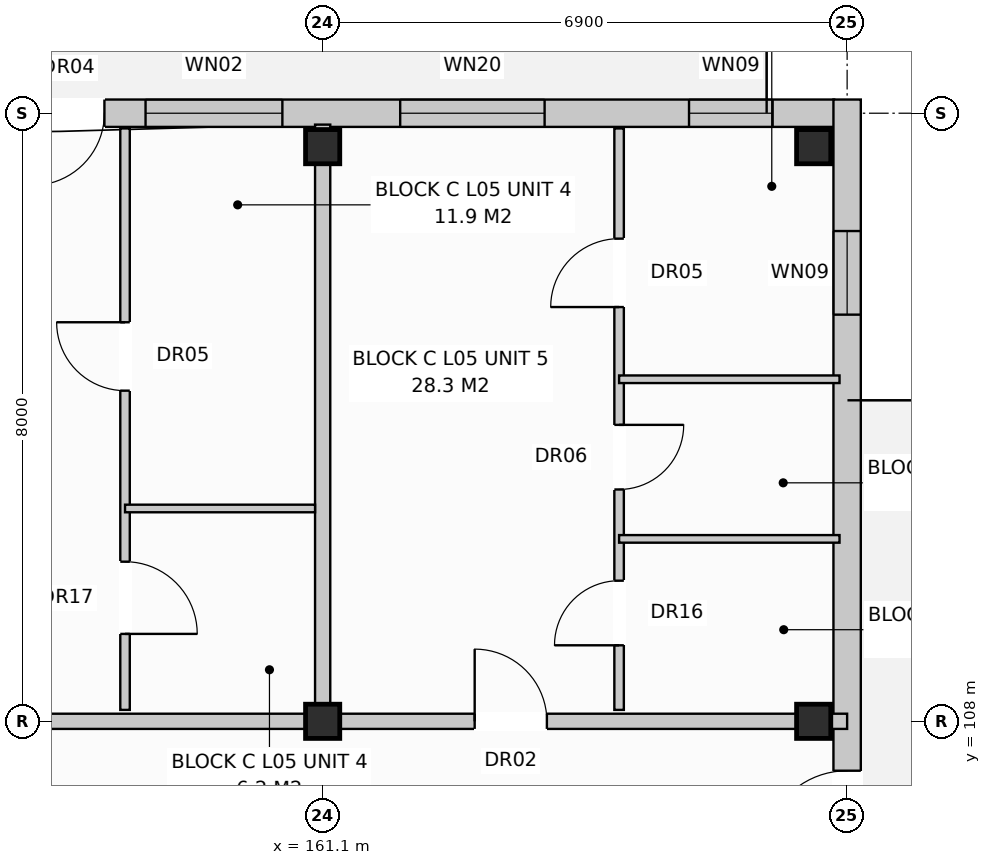
"""IFC4 building model, lengths in metres.
Left out: names, types, materials, properties, quantities, classifications, styles, units other than length and angle.
Written with IfcOpenShell. Run it as: python <this file> out.ifc"""

import sys

from ifc_helpers import new_model, si_unit, direction, frame, frame_2d, origin, origin_with_axes, origin_2d, place, context, subcontext, project, spatial, rectangle, extrude, element, fill, save


model = new_model("IFC4")
c1 = context("Model", 3, precision=1e-05, world=origin(), true_north=direction((0.0, 1.0)))
c2 = subcontext(c1, "Body", "Model", "MODEL_VIEW")
j1 = project(units=[si_unit("LENGTHUNIT", "METRE"), si_unit("PLANEANGLEUNIT", "RADIAN")], contexts=[c1])
p1 = place(None, origin())
s1 = spatial("IfcSite", under=j1, at=p1, CompositionType="ELEMENT")
p2 = place(p1, origin())
s2 = spatial("IfcBuilding", under=s1, at=p2, CompositionType="ELEMENT")
p3 = place(p2, frame((0.0, 0.0, 17.6)))
s3 = spatial("IfcBuildingStorey", under=s2, at=p3, CompositionType="ELEMENT", Elevation=17.6)
for number, where, z_axis, x_axis in (
    (1, (161.1, 108.0, 0.0), (0.0, 0.0, 1.0), (1.0, 0.0, 0.0)),
    (2, (161.1, 115.56, 0.0), (0.0, 0.0, 1.0), (1.0, 0.0, 0.0)),
    (3, (167.56, 108.0, 0.0), (0.0, 0.0, 1.0), (1.0, 0.0, 0.0)),
    (4, (167.56, 115.56, 0.0), (0.0, 0.0, 1.0), (1.0, 0.0, 0.0)),
):
    element("IfcColumn", number, at=place(p3, frame(where, z_axis=z_axis, x_axis=x_axis)), inside=s3, PredefinedType="COLUMN", context=c2, shape_type="SweptSolid", body=[
        extrude(rectangle(XDim=0.45, YDim=0.45, at=origin_2d()), origin(), (0.0, 0.0, 1.0), 3.2),
    ])
p4 = place(p3, frame((112.97, 116.0, 0.0), z_axis=(0.0, 0.0, 1.0), x_axis=(1.0, 0.0, 0.0)))
e5 = element("IfcWall", 5, at=p4, inside=s3, PredefinedType="STANDARD", context=c2, shape_type="SweptSolid", body=[
    extrude(rectangle(XDim=54.86, YDim=0.36, at=frame_2d((27.43, 0.0))), origin(), (0.0, 0.0, 1.0), 2.95),
])
p5 = place(p4, frame((4.891, 0.0, 0.0)))
e6 = element("IfcOpeningElement", 6, at=p5, cuts=e5, PredefinedType="OPENING", context=c2, shape_type="SweptSolid", body=[
    extrude(rectangle(XDim=0.95, YDim=2.1, at=frame_2d((0.475, 1.05))), frame((0.0, 0.192, 0.0), z_axis=(0.0, -1.0, 0.0), x_axis=(1.0, 0.0, 0.0)), (0.0, 0.0, 1.0), 0.384),
])
p6 = place(p4, frame((15.309, 0.0, 0.0)))
e7 = element("IfcOpeningElement", 7, at=p6, cuts=e5, PredefinedType="OPENING", context=c2, shape_type="SweptSolid", body=[
    extrude(rectangle(XDim=0.95, YDim=2.1, at=frame_2d((0.475, 1.05))), frame((0.0, 0.192, 0.0), z_axis=(0.0, -1.0, 0.0), x_axis=(1.0, 0.0, 0.0)), (0.0, 0.0, 1.0), 0.384),
])
p7 = place(p4, frame((31.409, 0.0, 0.0)))
e8 = element("IfcOpeningElement", 8, at=p7, cuts=e5, PredefinedType="OPENING", context=c2, shape_type="SweptSolid", body=[
    extrude(rectangle(XDim=0.95, YDim=2.1, at=frame_2d((0.475, 1.05))), frame((0.0, 0.192, 0.0), z_axis=(0.0, -1.0, 0.0), x_axis=(1.0, 0.0, 0.0)), (0.0, 0.0, 1.0), 0.384),
])
p8 = place(p4, frame((44.309, 0.0, 0.0)))
e9 = element("IfcOpeningElement", 9, at=p8, cuts=e5, PredefinedType="OPENING", context=c2, shape_type="SweptSolid", body=[
    extrude(rectangle(XDim=0.95, YDim=2.1, at=frame_2d((0.475, 1.05))), frame((0.0, 0.192, 0.0), z_axis=(0.0, -1.0, 0.0), x_axis=(1.0, 0.0, 0.0)), (0.0, 0.0, 1.0), 0.384),
])
p9 = place(p4, frame((2.025, 0.0, 0.8)))
e10 = element("IfcOpeningElement", 10, at=p9, cuts=e5, PredefinedType="OPENING", context=c2, shape_type="SweptSolid", body=[
    extrude(rectangle(XDim=1.95, YDim=1.65, at=frame_2d((0.975, 0.825))), frame((0.0, 0.192, 0.0), z_axis=(0.0, -1.0, 0.0), x_axis=(1.0, 0.0, 0.0)), (0.0, 0.0, 1.0), 0.384),
])
p10 = place(p4, frame((8.15, 0.0, 0.72)))
e11 = element("IfcOpeningElement", 11, at=p10, cuts=e5, PredefinedType="OPENING", context=c2, shape_type="SweptSolid", body=[
    extrude(rectangle(XDim=1.1, YDim=1.5, at=frame_2d((0.55, 0.75))), frame((0.0, 0.192, 0.0), z_axis=(0.0, -1.0, 0.0), x_axis=(1.0, 0.0, 0.0)), (0.0, 0.0, 1.0), 0.384),
])
p11 = place(p4, frame((11.675, 0.0, 0.85)))
e12 = element("IfcOpeningElement", 12, at=p11, cuts=e5, PredefinedType="OPENING", context=c2, shape_type="SweptSolid", body=[
    extrude(rectangle(XDim=1.35, YDim=1.6, at=frame_2d((0.675, 0.8))), frame((0.0, 0.192, 0.0), z_axis=(0.0, -1.0, 0.0), x_axis=(1.0, 0.0, 0.0)), (0.0, 0.0, 1.0), 0.384),
])
p12 = place(p4, frame((17.525, 0.0, 0.8)))
e13 = element("IfcOpeningElement", 13, at=p12, cuts=e5, PredefinedType="OPENING", context=c2, shape_type="SweptSolid", body=[
    extrude(rectangle(XDim=1.95, YDim=1.65, at=frame_2d((0.975, 0.825))), frame((0.0, 0.192, 0.0), z_axis=(0.0, -1.0, 0.0), x_axis=(1.0, 0.0, 0.0)), (0.0, 0.0, 1.0), 0.384),
])
p13 = place(p4, frame((21.6, 0.0, 0.8)))
e14 = element("IfcOpeningElement", 14, at=p13, cuts=e5, PredefinedType="OPENING", context=c2, shape_type="SweptSolid", body=[
    extrude(rectangle(XDim=1.8, YDim=1.7, at=frame_2d((0.9, 0.85))), frame((0.0, 0.192, 0.0), z_axis=(0.0, -1.0, 0.0), x_axis=(1.0, 0.0, 0.0)), (0.0, 0.0, 1.0), 0.384),
])
p14 = place(p4, frame((25.35, 0.0, 0.72)))
e15 = element("IfcOpeningElement", 15, at=p14, cuts=e5, PredefinedType="OPENING", context=c2, shape_type="SweptSolid", body=[
    extrude(rectangle(XDim=1.1, YDim=1.5, at=frame_2d((0.55, 0.75))), frame((0.0, 0.192, 0.0), z_axis=(0.0, -1.0, 0.0), x_axis=(1.0, 0.0, 0.0)), (0.0, 0.0, 1.0), 0.384),
])
p15 = place(p4, frame((29.125, 0.0, 0.8)))
e16 = element("IfcOpeningElement", 16, at=p15, cuts=e5, PredefinedType="OPENING", context=c2, shape_type="SweptSolid", body=[
    extrude(rectangle(XDim=1.95, YDim=1.65, at=frame_2d((0.975, 0.825))), frame((0.0, 0.192, 0.0), z_axis=(0.0, -1.0, 0.0), x_axis=(1.0, 0.0, 0.0)), (0.0, 0.0, 1.0), 0.384),
])
p16 = place(p4, frame((34.9, 0.0, 0.8)))
e17 = element("IfcOpeningElement", 17, at=p16, cuts=e5, PredefinedType="OPENING", context=c2, shape_type="SweptSolid", body=[
    extrude(rectangle(XDim=1.8, YDim=1.7, at=frame_2d((0.9, 0.85))), frame((0.0, 0.192, 0.0), z_axis=(0.0, -1.0, 0.0), x_axis=(1.0, 0.0, 0.0)), (0.0, 0.0, 1.0), 0.384),
])
p17 = place(p4, frame((38.45, 0.0, 0.72)))
e18 = element("IfcOpeningElement", 18, at=p17, cuts=e5, PredefinedType="OPENING", context=c2, shape_type="SweptSolid", body=[
    extrude(rectangle(XDim=1.1, YDim=1.5, at=frame_2d((0.55, 0.75))), frame((0.0, 0.192, 0.0), z_axis=(0.0, -1.0, 0.0), x_axis=(1.0, 0.0, 0.0)), (0.0, 0.0, 1.0), 0.384),
])
p18 = place(p4, frame((42.55, 0.0, 0.72)))
e19 = element("IfcOpeningElement", 19, at=p18, cuts=e5, PredefinedType="OPENING", context=c2, shape_type="SweptSolid", body=[
    extrude(rectangle(XDim=1.1, YDim=1.5, at=frame_2d((0.55, 0.75))), frame((0.0, 0.192, 0.0), z_axis=(0.0, -1.0, 0.0), x_axis=(1.0, 0.0, 0.0)), (0.0, 0.0, 1.0), 0.384),
])
p19 = place(p4, frame((45.8, 0.0, 0.8)))
e20 = element("IfcOpeningElement", 20, at=p19, cuts=e5, PredefinedType="OPENING", context=c2, shape_type="SweptSolid", body=[
    extrude(rectangle(XDim=1.8, YDim=1.7, at=frame_2d((0.9, 0.85))), frame((0.0, 0.192, 0.0), z_axis=(0.0, -1.0, 0.0), x_axis=(1.0, 0.0, 0.0)), (0.0, 0.0, 1.0), 0.384),
])
p20 = place(p4, frame((49.15, 0.0, 0.72)))
e21 = element("IfcOpeningElement", 21, at=p20, cuts=e5, PredefinedType="OPENING", context=c2, shape_type="SweptSolid", body=[
    extrude(rectangle(XDim=1.9, YDim=1.85, at=frame_2d((0.95, 0.925))), frame((0.0, 0.192, 0.0), z_axis=(0.0, -1.0, 0.0), x_axis=(1.0, 0.0, 0.0)), (0.0, 0.0, 1.0), 0.384),
])
p21 = place(p4, frame((52.95, 0.0, 0.72)))
e22 = element("IfcOpeningElement", 22, at=p21, cuts=e5, PredefinedType="OPENING", context=c2, shape_type="SweptSolid", body=[
    extrude(rectangle(XDim=1.1, YDim=1.5, at=frame_2d((0.55, 0.75))), frame((0.0, 0.192, 0.0), z_axis=(0.0, -1.0, 0.0), x_axis=(1.0, 0.0, 0.0)), (0.0, 0.0, 1.0), 0.384),
])
p22 = place(p3, frame((168.0, 97.42, 0.0), z_axis=(0.0, 0.0, 1.0), x_axis=(0.0, 1.0, 0.0)))
e23 = element("IfcWall", 23, at=p22, inside=s3, PredefinedType="STANDARD", context=c2, shape_type="SweptSolid", body=[
    extrude(rectangle(XDim=18.76, YDim=0.36, at=frame_2d((9.38, 0.0))), origin(), (0.0, 0.0, 1.0), 2.95),
])
p23 = place(p22, frame((8.83, 0.0, 0.0)))
e24 = element("IfcOpeningElement", 24, at=p23, cuts=e23, PredefinedType="OPENING", context=c2, shape_type="SweptSolid", body=[
    extrude(rectangle(XDim=1.1, YDim=2.1, at=frame_2d((0.55, 1.05))), frame((0.0, 0.192, 0.0), z_axis=(0.0, -1.0, 0.0), x_axis=(1.0, 0.0, 0.0)), (0.0, 0.0, 1.0), 0.384),
])
p24 = place(p22, frame((1.73, 0.0, 0.72)))
e25 = element("IfcOpeningElement", 25, at=p24, cuts=e23, PredefinedType="OPENING", context=c2, shape_type="SweptSolid", body=[
    extrude(rectangle(XDim=1.1, YDim=1.5, at=frame_2d((0.55, 0.75))), frame((0.0, 0.192, 0.0), z_axis=(0.0, -1.0, 0.0), x_axis=(1.0, 0.0, 0.0)), (0.0, 0.0, 1.0), 0.384),
])
p25 = place(p22, frame((15.93, 0.0, 0.72)))
e26 = element("IfcOpeningElement", 26, at=p25, cuts=e23, PredefinedType="OPENING", context=c2, shape_type="SweptSolid", body=[
    extrude(rectangle(XDim=1.1, YDim=1.5, at=frame_2d((0.55, 0.75))), frame((0.0, 0.192, 0.0), z_axis=(0.0, -1.0, 0.0), x_axis=(1.0, 0.0, 0.0)), (0.0, 0.0, 1.0), 0.384),
])
p26 = place(p3, frame((161.1, 108.15, 0.0), z_axis=(0.0, 0.0, 1.0), x_axis=(0.0, 1.0, 0.0)))
e27 = element("IfcWall", 27, at=p26, inside=s3, PredefinedType="PARTITIONING", context=c2, shape_type="SweptSolid", body=[
    extrude(rectangle(XDim=7.7, YDim=0.2, at=frame_2d((3.85, 0.0))), origin(), (0.0, 0.0, 1.0), 2.39),
])
p27 = place(p3, frame((154.2, 108.0, 0.0), z_axis=(0.0, 0.0, 1.0), x_axis=(1.0, 0.0, 0.0)))
e28 = element("IfcWall", 28, at=p27, inside=s3, PredefinedType="PARTITIONING", context=c2, shape_type="SweptSolid", body=[
    extrude(rectangle(XDim=6.9, YDim=0.2, at=frame_2d((3.45, 0.0))), origin(), (0.0, 0.0, 1.0), 2.39),
])
p28 = place(p27, frame((2.0, 0.0, 0.0)))
e29 = element("IfcOpeningElement", 29, at=p28, cuts=e28, PredefinedType="OPENING", context=c2, shape_type="SweptSolid", body=[
    extrude(rectangle(XDim=0.95, YDim=2.15, at=frame_2d((0.475, 1.075))), frame((0.0, 0.112, 0.0), z_axis=(0.0, -1.0, 0.0), x_axis=(1.0, 0.0, 0.0)), (0.0, 0.0, 1.0), 0.224),
])
p29 = place(p3, frame((158.5, 108.15, 0.0), z_axis=(0.0, 0.0, 1.0), x_axis=(0.0, 1.0, 0.0)))
e30 = element("IfcWall", 30, at=p29, inside=s3, PredefinedType="PARTITIONING", context=c2, shape_type="SweptSolid", body=[
    extrude(rectangle(XDim=7.65, YDim=0.125, at=frame_2d((3.825, 0.0))), origin(), (0.0, 0.0, 1.0), 2.95),
])
p30 = place(p29, frame((1.0, 0.0, 0.0)))
e31 = element("IfcOpeningElement", 31, at=p30, cuts=e30, PredefinedType="OPENING", context=c2, shape_type="SweptSolid", body=[
    extrude(rectangle(XDim=0.95, YDim=2.1, at=frame_2d((0.475, 1.05))), frame((0.0, 0.074, 0.0), z_axis=(0.0, -1.0, 0.0), x_axis=(1.0, 0.0, 0.0)), (0.0, 0.0, 1.0), 0.149),
])
p31 = place(p29, frame((4.2, 0.0, 0.0)))
e32 = element("IfcOpeningElement", 32, at=p31, cuts=e30, PredefinedType="OPENING", context=c2, shape_type="SweptSolid", body=[
    extrude(rectangle(XDim=0.9, YDim=2.1, at=frame_2d((0.45, 1.05))), frame((0.0, 0.074, 0.0), z_axis=(0.0, -1.0, 0.0), x_axis=(1.0, 0.0, 0.0)), (0.0, 0.0, 1.0), 0.149),
])
p32 = place(p3, frame((158.5, 110.8, 0.0), z_axis=(0.0, 0.0, 1.0), x_axis=(1.0, 0.0, 0.0)))
e33 = element("IfcWall", 33, at=p32, inside=s3, PredefinedType="PARTITIONING", context=c2, shape_type="SweptSolid", body=[
    extrude(rectangle(XDim=2.5, YDim=0.1, at=frame_2d((1.25, 0.0))), origin(), (0.0, 0.0, 1.0), 2.95),
])
p33 = place(p3, frame((161.1, 108.0, 0.0), z_axis=(0.0, 0.0, 1.0), x_axis=(1.0, 0.0, 0.0)))
e34 = element("IfcWall", 34, at=p33, inside=s3, PredefinedType="PARTITIONING", context=c2, shape_type="SweptSolid", body=[
    extrude(rectangle(XDim=6.9, YDim=0.2, at=frame_2d((3.45, 0.0))), origin(), (0.0, 0.0, 1.0), 2.39),
])
p34 = place(p33, frame((2.0, 0.0, 0.0)))
e35 = element("IfcOpeningElement", 35, at=p34, cuts=e34, PredefinedType="OPENING", context=c2, shape_type="SweptSolid", body=[
    extrude(rectangle(XDim=0.95, YDim=2.15, at=frame_2d((0.475, 1.075))), frame((0.0, 0.112, 0.0), z_axis=(0.0, -1.0, 0.0), x_axis=(1.0, 0.0, 0.0)), (0.0, 0.0, 1.0), 0.224),
])
p35 = place(p3, frame((165.0, 108.15, 0.0), z_axis=(0.0, 0.0, 1.0), x_axis=(0.0, 1.0, 0.0)))
e36 = element("IfcWall", 36, at=p35, inside=s3, PredefinedType="PARTITIONING", context=c2, shape_type="SweptSolid", body=[
    extrude(rectangle(XDim=7.65, YDim=0.125, at=frame_2d((3.825, 0.0))), origin(), (0.0, 0.0, 1.0), 2.95),
])
p36 = place(p35, frame((0.85, 0.0, 0.0)))
e37 = element("IfcOpeningElement", 37, at=p36, cuts=e36, PredefinedType="OPENING", context=c2, shape_type="SweptSolid", body=[
    extrude(rectangle(XDim=0.85, YDim=2.1, at=frame_2d((0.425, 1.05))), frame((0.0, 0.074, 0.0), z_axis=(0.0, -1.0, 0.0), x_axis=(1.0, 0.0, 0.0)), (0.0, 0.0, 1.0), 0.149),
])
p37 = place(p35, frame((2.9, 0.0, 0.0)))
e38 = element("IfcOpeningElement", 38, at=p37, cuts=e36, PredefinedType="OPENING", context=c2, shape_type="SweptSolid", body=[
    extrude(rectangle(XDim=0.85, YDim=2.05, at=frame_2d((0.425, 1.025))), frame((0.0, 0.074, 0.0), z_axis=(0.0, -1.0, 0.0), x_axis=(1.0, 0.0, 0.0)), (0.0, 0.0, 1.0), 0.149),
])
p38 = place(p35, frame((5.3, 0.0, 0.0)))
e39 = element("IfcOpeningElement", 39, at=p38, cuts=e36, PredefinedType="OPENING", context=c2, shape_type="SweptSolid", body=[
    extrude(rectangle(XDim=0.9, YDim=2.1, at=frame_2d((0.45, 1.05))), frame((0.0, 0.074, 0.0), z_axis=(0.0, -1.0, 0.0), x_axis=(1.0, 0.0, 0.0)), (0.0, 0.0, 1.0), 0.149),
])
for number, where, z_axis, x_axis in (
    (40, (165.0, 110.4, 0.0), (0.0, 0.0, 1.0), (1.0, 0.0, 0.0)),
    (41, (165.0, 112.5, 0.0), (0.0, 0.0, 1.0), (1.0, 0.0, 0.0)),
):
    element("IfcWall", number, at=place(p3, frame(where, z_axis=z_axis, x_axis=x_axis)), inside=s3, PredefinedType="PARTITIONING", context=c2, shape_type="SweptSolid", body=[
        extrude(rectangle(XDim=2.9, YDim=0.1, at=frame_2d((1.45, 0.0))), origin(), (0.0, 0.0, 1.0), 2.95),
    ])
p39 = place(p8, frame((0.95, 0.0, 0.0), z_axis=(0.0, 0.0, 1.0), x_axis=(-1.0, 0.0, 0.0)))
e42 = element("IfcDoor", 42, at=p39, inside=s3, OperationType="SINGLE_SWING_LEFT", PredefinedType="DOOR", context=c2, shape_type="SweptSolid", body=[
    extrude(rectangle(XDim=0.95, YDim=2.1, at=frame_2d((0.475, 1.05))), frame((0.0, 0.025, 0.0), z_axis=(0.0, -1.0, 0.0), x_axis=(1.0, 0.0, 0.0)), (0.0, 0.0, 1.0), 0.05),
])
fill(e9, e42)
p40 = place(p19, origin_with_axes())
e43 = element("IfcWindow", 43, at=p40, inside=s3, PartitioningType="SINGLE_PANEL", PredefinedType="WINDOW", context=c2, shape_type="SweptSolid", body=[
    extrude(rectangle(XDim=1.8, YDim=1.7, at=frame_2d((0.9, 0.85))), frame((0.0, 0.03, 0.0), z_axis=(0.0, -1.0, 0.0), x_axis=(1.0, 0.0, 0.0)), (0.0, 0.0, 1.0), 0.06),
])
fill(e20, e43)
p41 = place(p20, origin_with_axes())
e44 = element("IfcWindow", 44, at=p41, inside=s3, PartitioningType="SINGLE_PANEL", PredefinedType="WINDOW", context=c2, shape_type="SweptSolid", body=[
    extrude(rectangle(XDim=1.9, YDim=1.85, at=frame_2d((0.95, 0.925))), frame((0.0, 0.03, 0.0), z_axis=(0.0, -1.0, 0.0), x_axis=(1.0, 0.0, 0.0)), (0.0, 0.0, 1.0), 0.06),
])
fill(e21, e44)
p42 = place(p21, origin_with_axes())
e45 = element("IfcWindow", 45, at=p42, inside=s3, PartitioningType="SINGLE_PANEL", PredefinedType="WINDOW", context=c2, shape_type="SweptSolid", body=[
    extrude(rectangle(XDim=1.1, YDim=1.5, at=frame_2d((0.55, 0.75))), frame((0.0, 0.03, 0.0), z_axis=(0.0, -1.0, 0.0), x_axis=(1.0, 0.0, 0.0)), (0.0, 0.0, 1.0), 0.06),
])
fill(e22, e45)
p43 = place(p23, origin_with_axes())
e46 = element("IfcDoor", 46, at=p43, inside=s3, OperationType="SINGLE_SWING_LEFT", PredefinedType="DOOR", context=c2, shape_type="SweptSolid", body=[
    extrude(rectangle(XDim=1.1, YDim=2.1, at=frame_2d((0.55, 1.05))), frame((0.0, 0.025, 0.0), z_axis=(0.0, -1.0, 0.0), x_axis=(1.0, 0.0, 0.0)), (0.0, 0.0, 1.0), 0.05),
])
fill(e24, e46)
p44 = place(p25, origin_with_axes())
e47 = element("IfcWindow", 47, at=p44, inside=s3, PartitioningType="SINGLE_PANEL", PredefinedType="WINDOW", context=c2, shape_type="SweptSolid", body=[
    extrude(rectangle(XDim=1.1, YDim=1.5, at=frame_2d((0.55, 0.75))), frame((0.0, 0.03, 0.0), z_axis=(0.0, -1.0, 0.0), x_axis=(1.0, 0.0, 0.0)), (0.0, 0.0, 1.0), 0.06),
])
fill(e26, e47)
p45 = place(p30, frame((0.95, 0.0, 0.0), z_axis=(0.0, 0.0, 1.0), x_axis=(-1.0, 0.0, 0.0)))
e48 = element("IfcDoor", 48, at=p45, inside=s3, OperationType="SINGLE_SWING_LEFT", PredefinedType="DOOR", context=c2, shape_type="SweptSolid", body=[
    extrude(rectangle(XDim=0.95, YDim=2.1, at=frame_2d((0.475, 1.05))), frame((0.0, 0.025, 0.0), z_axis=(0.0, -1.0, 0.0), x_axis=(1.0, 0.0, 0.0)), (0.0, 0.0, 1.0), 0.05),
])
fill(e31, e48)
p46 = place(p31, origin_with_axes())
e49 = element("IfcDoor", 49, at=p46, inside=s3, OperationType="SINGLE_SWING_RIGHT", PredefinedType="DOOR", context=c2, shape_type="SweptSolid", body=[
    extrude(rectangle(XDim=0.9, YDim=2.1, at=frame_2d((0.45, 1.05))), frame((0.0, 0.025, 0.0), z_axis=(0.0, -1.0, 0.0), x_axis=(1.0, 0.0, 0.0)), (0.0, 0.0, 1.0), 0.05),
])
fill(e32, e49)
p47 = place(p34, origin_with_axes())
e50 = element("IfcDoor", 50, at=p47, inside=s3, OperationType="SINGLE_SWING_LEFT", PredefinedType="DOOR", context=c2, shape_type="SweptSolid", body=[
    extrude(rectangle(XDim=0.95, YDim=2.15, at=frame_2d((0.475, 1.075))), frame((0.0, 0.025, 0.0), z_axis=(0.0, -1.0, 0.0), x_axis=(1.0, 0.0, 0.0)), (0.0, 0.0, 1.0), 0.05),
])
fill(e35, e50)
p48 = place(p36, origin_with_axes())
e51 = element("IfcDoor", 51, at=p48, inside=s3, OperationType="SINGLE_SWING_LEFT", PredefinedType="DOOR", context=c2, shape_type="SweptSolid", body=[
    extrude(rectangle(XDim=0.85, YDim=2.1, at=frame_2d((0.425, 1.05))), frame((0.0, 0.025, 0.0), z_axis=(0.0, -1.0, 0.0), x_axis=(1.0, 0.0, 0.0)), (0.0, 0.0, 1.0), 0.05),
])
fill(e37, e51)
p49 = place(p37, frame((0.85, 0.0, 0.0), z_axis=(0.0, 0.0, 1.0), x_axis=(-1.0, 0.0, 0.0)))
e52 = element("IfcDoor", 52, at=p49, inside=s3, OperationType="SINGLE_SWING_RIGHT", PredefinedType="DOOR", context=c2, shape_type="SweptSolid", body=[
    extrude(rectangle(XDim=0.85, YDim=2.05, at=frame_2d((0.425, 1.025))), frame((0.0, 0.025, 0.0), z_axis=(0.0, -1.0, 0.0), x_axis=(1.0, 0.0, 0.0)), (0.0, 0.0, 1.0), 0.05),
])
fill(e38, e52)
p50 = place(p38, origin_with_axes())
e53 = element("IfcDoor", 53, at=p50, inside=s3, OperationType="SINGLE_SWING_LEFT", PredefinedType="DOOR", context=c2, shape_type="SweptSolid", body=[
    extrude(rectangle(XDim=0.9, YDim=2.1, at=frame_2d((0.45, 1.05))), frame((0.0, 0.025, 0.0), z_axis=(0.0, -1.0, 0.0), x_axis=(1.0, 0.0, 0.0)), (0.0, 0.0, 1.0), 0.05),
])
fill(e39, e53)
save(model, sys.argv[1])
